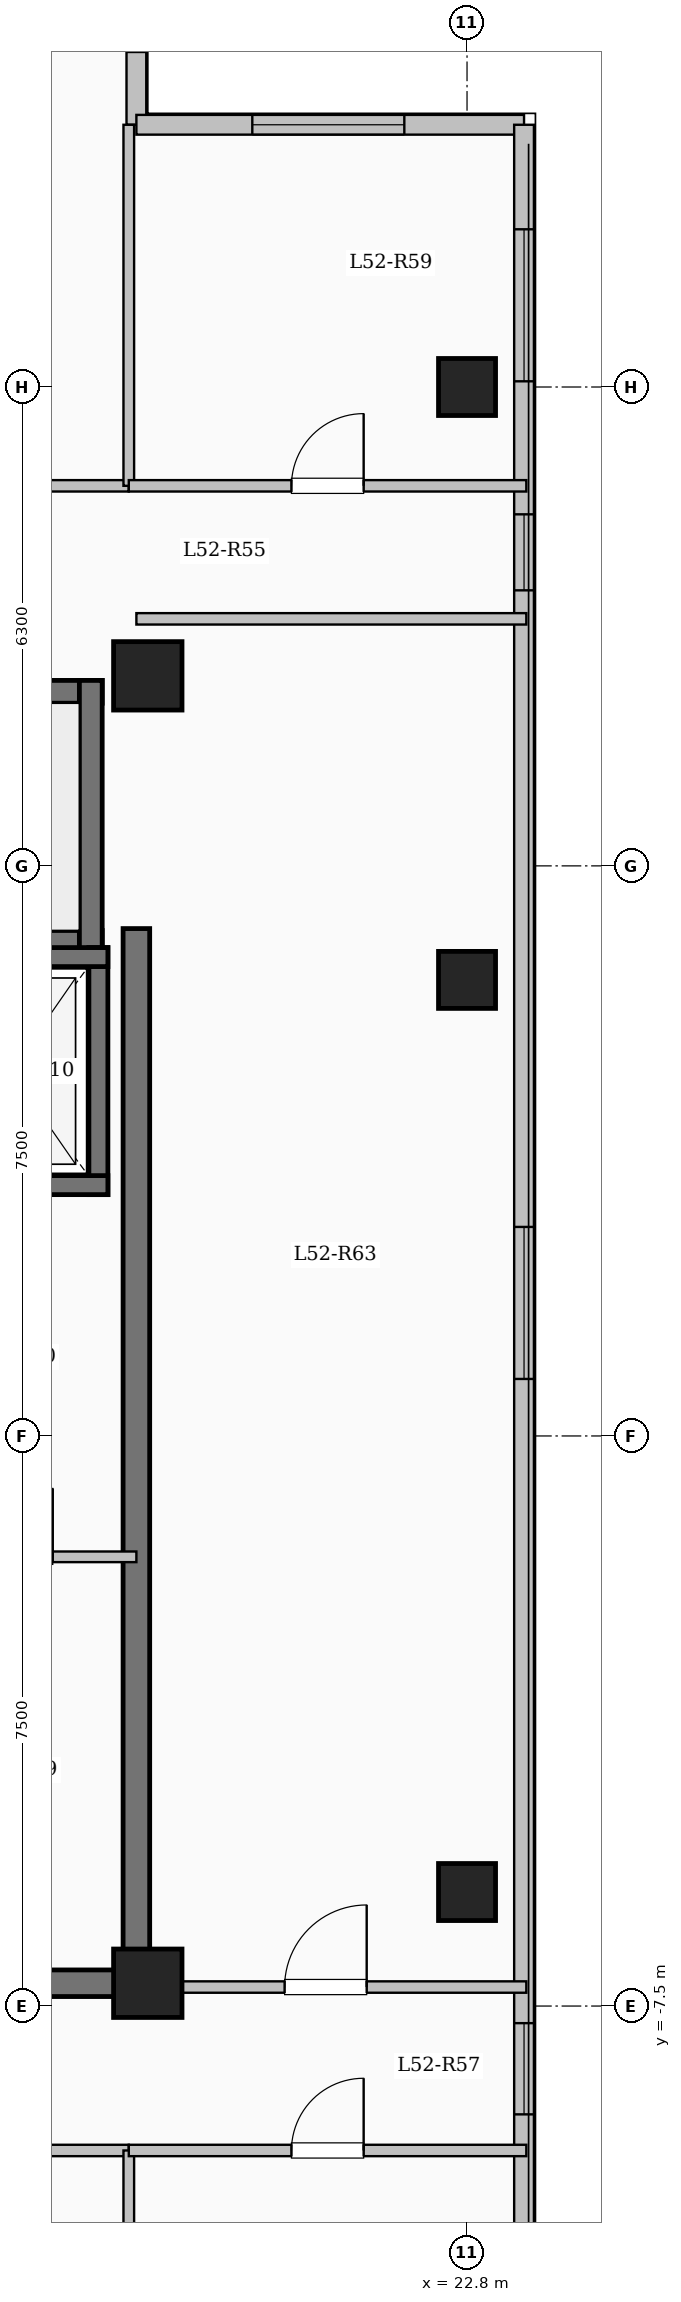
"""IFC4 building model, lengths in metres.
Left out: names, types, materials, properties, quantities, classifications, styles, units other than length and angle.
Written with IfcOpenShell. Run it as: python <this file> out.ifc"""

import sys

from ifc_helpers import new_model, si_unit, direction, frame, frame_2d, origin, origin_2d, place, context, subcontext, project, spatial, rectangle, extrude, element, fill, save


model = new_model("IFC4")
c1 = context("Model", 3, precision=1e-05, world=origin(), true_north=direction((0.0, 1.0)))
c2 = subcontext(c1, "Body", "Model", "MODEL_VIEW")
j1 = project(units=[si_unit("LENGTHUNIT", "METRE"), si_unit("PLANEANGLEUNIT", "RADIAN")], contexts=[c1])
p1 = place(None, origin())
s1 = spatial("IfcSite", under=j1, at=p1, CompositionType="ELEMENT")
p2 = place(p1, origin())
s2 = spatial("IfcBuilding", under=s1, at=p2, CompositionType="ELEMENT")
p3 = place(p2, frame((0.0, 0.0, 193.6)))
s3 = spatial("IfcBuildingStorey", under=s2, at=p3, CompositionType="ELEMENT", Elevation=193.6)
for number, where, z_axis, x_axis in (
    (1, (18.6, -7.2, 0.0), (0.0, 0.0, 1.0), (1.0, 0.0, 0.0)),
    (2, (18.6, 10.0, 0.0), (0.0, 0.0, 1.0), (1.0, 0.0, 0.0)),
):
    element("IfcColumn", number, at=place(p3, frame(where, z_axis=z_axis, x_axis=x_axis)), inside=s3, PredefinedType="COLUMN", context=c2, shape_type="SweptSolid", body=[
        extrude(rectangle(XDim=0.9, YDim=0.9, at=origin_2d()), origin(), (0.0, 0.0, 1.0), 3.35),
    ])
for number, where, z_axis, x_axis in (
    (3, (22.8, -6.0, 0.0), (0.0, 0.0, 1.0), (1.0, 0.0, 0.0)),
    (4, (22.8, 6.0, 0.0), (0.0, 0.0, 1.0), (1.0, 0.0, 0.0)),
    (5, (22.8, 13.8, 0.0), (0.0, 0.0, 1.0), (1.0, 0.0, 0.0)),
):
    element("IfcColumn", number, at=place(p3, frame(where, z_axis=z_axis, x_axis=x_axis)), inside=s3, PredefinedType="COLUMN", context=c2, shape_type="SweptSolid", body=[
        extrude(rectangle(XDim=0.75, YDim=0.75, at=origin_2d()), origin(), (0.0, 0.0, 1.0), 3.35),
    ])
p4 = place(p3, frame((18.45, 20.85, 0.0), z_axis=(0.0, 0.0, 1.0), x_axis=(0.0, -1.0, 0.0)))
e6 = element("IfcWall", 6, at=p4, inside=s3, PredefinedType="SOLIDWALL", context=c2, shape_type="SweptSolid", body=[
    extrude(rectangle(XDim=3.6, YDim=0.26, at=frame_2d((1.8, 0.0))), origin(), (0.0, 0.0, 1.0), 3.1),
])
p5 = place(p4, frame((0.992, 0.0, 0.9)))
e7 = element("IfcOpeningElement", 7, at=p5, cuts=e6, PredefinedType="OPENING", context=c2, shape_type="SweptSolid", body=[
    extrude(rectangle(XDim=1.65, YDim=1.6, at=frame_2d((0.825, 0.8))), frame((0.0, 0.14, 0.0), z_axis=(0.0, -1.0, 0.0), x_axis=(1.0, 0.0, 0.0)), (0.0, 0.0, 1.0), 0.28),
])
p6 = place(p3, frame((18.45, 17.25, 0.0), z_axis=(0.0, 0.0, 1.0), x_axis=(1.0, 0.0, 0.0)))
e8 = element("IfcWall", 8, at=p6, inside=s3, PredefinedType="SOLIDWALL", context=c2, shape_type="SweptSolid", body=[
    extrude(rectangle(XDim=5.1, YDim=0.26, at=frame_2d((2.55, 0.0))), origin(), (0.0, 0.0, 1.0), 3.1),
])
p7 = place(p6, frame((1.525, 0.0, 0.9)))
e9 = element("IfcOpeningElement", 9, at=p7, cuts=e8, PredefinedType="OPENING", context=c2, shape_type="SweptSolid", body=[
    extrude(rectangle(XDim=2.0, YDim=1.7, at=frame_2d((1.0, 0.85))), frame((0.0, 0.14, 0.0), z_axis=(0.0, -1.0, 0.0), x_axis=(1.0, 0.0, 0.0)), (0.0, 0.0, 1.0), 0.28),
])
p8 = place(p3, frame((23.55, 17.25, 0.0), z_axis=(0.0, 0.0, 1.0), x_axis=(0.0, -1.0, 0.0)))
e10 = element("IfcWall", 10, at=p8, inside=s3, PredefinedType="SOLIDWALL", context=c2, shape_type="SweptSolid", body=[
    extrude(rectangle(XDim=34.5, YDim=0.26, at=frame_2d((17.25, 0.0))), origin(), (0.0, 0.0, 1.0), 3.1),
])
p9 = place(p8, frame((1.375, 0.0, 0.9)))
e11 = element("IfcOpeningElement", 11, at=p9, cuts=e10, PredefinedType="OPENING", context=c2, shape_type="SweptSolid", body=[
    extrude(rectangle(XDim=2.0, YDim=1.7, at=frame_2d((1.0, 0.85))), frame((0.0, 0.14, 0.0), z_axis=(0.0, -1.0, 0.0), x_axis=(1.0, 0.0, 0.0)), (0.0, 0.0, 1.0), 0.28),
])
p10 = place(p8, frame((5.125, 0.0, 0.95)))
e12 = element("IfcOpeningElement", 12, at=p10, cuts=e10, PredefinedType="OPENING", context=c2, shape_type="SweptSolid", body=[
    extrude(rectangle(XDim=1.0, YDim=1.5, at=frame_2d((0.5, 0.75))), frame((0.0, 0.14, 0.0), z_axis=(0.0, -1.0, 0.0), x_axis=(1.0, 0.0, 0.0)), (0.0, 0.0, 1.0), 0.28),
])
p11 = place(p8, frame((14.5, 0.0, 0.9)))
e13 = element("IfcOpeningElement", 13, at=p11, cuts=e10, PredefinedType="OPENING", context=c2, shape_type="SweptSolid", body=[
    extrude(rectangle(XDim=2.0, YDim=1.7, at=frame_2d((1.0, 0.85))), frame((0.0, 0.14, 0.0), z_axis=(0.0, -1.0, 0.0), x_axis=(1.0, 0.0, 0.0)), (0.0, 0.0, 1.0), 0.28),
])
p12 = place(p8, frame((24.975, 0.0, 0.95)))
e14 = element("IfcOpeningElement", 14, at=p12, cuts=e10, PredefinedType="OPENING", context=c2, shape_type="SweptSolid", body=[
    extrude(rectangle(XDim=1.2, YDim=1.5, at=frame_2d((0.6, 0.75))), frame((0.0, 0.14, 0.0), z_axis=(0.0, -1.0, 0.0), x_axis=(1.0, 0.0, 0.0)), (0.0, 0.0, 1.0), 0.28),
])
p13 = place(p8, frame((29.475, 0.0, 0.9)))
e15 = element("IfcOpeningElement", 15, at=p13, cuts=e10, PredefinedType="OPENING", context=c2, shape_type="SweptSolid", body=[
    extrude(rectangle(XDim=2.2, YDim=1.75, at=frame_2d((1.1, 0.875))), frame((0.0, 0.14, 0.0), z_axis=(0.0, -1.0, 0.0), x_axis=(1.0, 0.0, 0.0)), (0.0, 0.0, 1.0), 0.28),
])
p14 = place(p3, frame((10.0, 9.79, 0.0), z_axis=(0.0, 0.0, 1.0), x_axis=(1.0, 0.0, 0.0)))
e16 = element("IfcWall", 16, at=p14, inside=s3, PredefinedType="SHEAR", context=c2, shape_type="SweptSolid", body=[
    extrude(rectangle(XDim=8.0, YDim=0.3, at=frame_2d((4.0, 0.0))), origin(), (0.0, 0.0, 1.0), 3.35),
])
p15 = place(p3, frame((10.0, 6.5, 0.0), z_axis=(0.0, 0.0, 1.0), x_axis=(1.0, 0.0, 0.0)))
e17 = element("IfcWall", 17, at=p15, inside=s3, PredefinedType="SHEAR", context=c2, shape_type="SweptSolid", body=[
    extrude(rectangle(XDim=8.0, YDim=0.3, at=frame_2d((4.0, 0.0))), origin(), (0.0, 0.0, 1.0), 3.35),
])
p16 = place(p15, frame((0.55, 0.0, 0.0)))
e18 = element("IfcOpeningElement", 18, at=p16, cuts=e17, PredefinedType="OPENING", context=c2, shape_type="SweptSolid", body=[
    extrude(rectangle(XDim=1.0, YDim=2.15, at=frame_2d((0.5, 1.075))), frame((0.0, 0.16, 0.0), z_axis=(0.0, -1.0, 0.0), x_axis=(1.0, 0.0, 0.0)), (0.0, 0.0, 1.0), 0.32),
])
p17 = place(p3, frame((17.85, 6.35, 0.0), z_axis=(0.0, 0.0, 1.0), x_axis=(0.0, 1.0, 0.0)))
e19 = element("IfcWall", 19, at=p17, inside=s3, PredefinedType="SHEAR", context=c2, shape_type="SweptSolid", body=[
    extrude(rectangle(XDim=3.59, YDim=0.3, at=frame_2d((1.795, 0.0))), origin(), (0.0, 0.0, 1.0), 3.35),
])
p18 = place(p3, frame((17.95, 3.175, 0.0), z_axis=(0.0, 0.0, 1.0), x_axis=(0.0, 1.0, 0.0)))
e20 = element("IfcWall", 20, at=p18, inside=s3, PredefinedType="SHEAR", context=c2, shape_type="SweptSolid", body=[
    extrude(rectangle(XDim=3.25, YDim=0.25, at=frame_2d((1.625, 0.0))), origin(), (0.0, 0.0, 1.0), 3.35),
])
for number, where, z_axis, x_axis in (
    (21, (15.525, 3.3, 0.0), (0.0, 0.0, 1.0), (1.0, 0.0, 0.0)),
    (22, (15.525, 6.3, 0.0), (0.0, 0.0, 1.0), (1.0, 0.0, 0.0)),
):
    element("IfcWall", number, at=place(p3, frame(where, z_axis=z_axis, x_axis=x_axis)), inside=s3, PredefinedType="SHEAR", context=c2, shape_type="SweptSolid", body=[
        extrude(rectangle(XDim=2.55, YDim=0.25, at=frame_2d((1.275, 0.0))), origin(), (0.0, 0.0, 1.0), 3.35),
    ])
p19 = place(p3, frame((18.45, -7.375, 0.0), z_axis=(0.0, 0.0, 1.0), x_axis=(0.0, 1.0, 0.0)))
e23 = element("IfcWall", 23, at=p19, inside=s3, PredefinedType="SHEAR", context=c2, shape_type="SweptSolid", body=[
    extrude(rectangle(XDim=14.05, YDim=0.35, at=frame_2d((7.025, 0.0))), origin(), (0.0, 0.0, 1.0), 3.35),
])
p20 = place(p3, frame((12.625, -7.2, 0.0), z_axis=(0.0, 0.0, 1.0), x_axis=(1.0, 0.0, 0.0)))
e24 = element("IfcWall", 24, at=p20, inside=s3, PredefinedType="SHEAR", context=c2, shape_type="SweptSolid", body=[
    extrude(rectangle(XDim=6.0, YDim=0.35, at=frame_2d((3.0, 0.0))), origin(), (0.0, 0.0, 1.0), 3.35),
])
p21 = place(p3, frame((15.4, -1.59, 0.0), z_axis=(0.0, 0.0, 1.0), x_axis=(1.0, 0.0, 0.0)))
e25 = element("IfcWall", 25, at=p21, inside=s3, PredefinedType="PARTITIONING", context=c2, shape_type="SweptSolid", body=[
    extrude(rectangle(XDim=3.05, YDim=0.14, at=frame_2d((1.525, 0.0))), origin(), (0.0, 0.0, 1.0), 3.1),
])
p22 = place(p21, frame((1.05, 0.0, 0.0)))
e26 = element("IfcOpeningElement", 26, at=p22, cuts=e25, PredefinedType="OPENING", context=c2, shape_type="SweptSolid", body=[
    extrude(rectangle(XDim=0.9, YDim=2.08, at=frame_2d((0.45, 1.04))), frame((0.0, 0.08, 0.0), z_axis=(0.0, -1.0, 0.0), x_axis=(1.0, 0.0, 0.0)), (0.0, 0.0, 1.0), 0.16),
])
p23 = place(p3, frame((3.85, 12.5, 0.0), z_axis=(0.0, 0.0, 1.0), x_axis=(1.0, 0.0, 0.0)))
e27 = element("IfcWall", 27, at=p23, inside=s3, PredefinedType="PARTITIONING", context=c2, shape_type="SweptSolid", body=[
    extrude(rectangle(XDim=14.5, YDim=0.15, at=frame_2d((7.25, 0.0))), origin(), (0.0, 0.0, 1.0), 3.1),
])
p24 = place(p23, frame((2.186, 0.0, 0.0)))
e28 = element("IfcOpeningElement", 28, at=p24, cuts=e27, PredefinedType="OPENING", context=c2, shape_type="SweptSolid", body=[
    extrude(rectangle(XDim=0.95, YDim=2.15, at=frame_2d((0.475, 1.075))), frame((0.0, 0.085, 0.0), z_axis=(0.0, -1.0, 0.0), x_axis=(1.0, 0.0, 0.0)), (0.0, 0.0, 1.0), 0.17),
])
p25 = place(p23, frame((7.379, 0.0, 0.0)))
e29 = element("IfcOpeningElement", 29, at=p25, cuts=e27, PredefinedType="OPENING", context=c2, shape_type="SweptSolid", body=[
    extrude(rectangle(XDim=0.95, YDim=2.15, at=frame_2d((0.475, 1.075))), frame((0.0, 0.085, 0.0), z_axis=(0.0, -1.0, 0.0), x_axis=(1.0, 0.0, 0.0)), (0.0, 0.0, 1.0), 0.17),
])
p26 = place(p23, frame((11.998, 0.0, 0.0)))
e30 = element("IfcOpeningElement", 30, at=p26, cuts=e27, PredefinedType="OPENING", context=c2, shape_type="SweptSolid", body=[
    extrude(rectangle(XDim=0.95, YDim=2.15, at=frame_2d((0.475, 1.075))), frame((0.0, 0.085, 0.0), z_axis=(0.0, -1.0, 0.0), x_axis=(1.0, 0.0, 0.0)), (0.0, 0.0, 1.0), 0.17),
])
p27 = place(p3, frame((8.55, -9.4, 0.0), z_axis=(0.0, 0.0, 1.0), x_axis=(1.0, 0.0, 0.0)))
e31 = element("IfcWall", 31, at=p27, inside=s3, PredefinedType="PARTITIONING", context=c2, shape_type="SweptSolid", body=[
    extrude(rectangle(XDim=9.8, YDim=0.15, at=frame_2d((4.9, 0.0))), origin(), (0.0, 0.0, 1.0), 3.1),
])
p28 = place(p27, frame((0.9, 0.0, 0.0)))
e32 = element("IfcOpeningElement", 32, at=p28, cuts=e31, PredefinedType="OPENING", context=c2, shape_type="SweptSolid", body=[
    extrude(rectangle(XDim=0.96, YDim=2.15, at=frame_2d((0.48, 1.075))), frame((0.0, 0.085, 0.0), z_axis=(0.0, -1.0, 0.0), x_axis=(1.0, 0.0, 0.0)), (0.0, 0.0, 1.0), 0.17),
])
p29 = place(p27, frame((5.625, 0.0, 0.0)))
e33 = element("IfcOpeningElement", 33, at=p29, cuts=e31, PredefinedType="OPENING", context=c2, shape_type="SweptSolid", body=[
    extrude(rectangle(XDim=0.96, YDim=2.15, at=frame_2d((0.48, 1.075))), frame((0.0, 0.085, 0.0), z_axis=(0.0, -1.0, 0.0), x_axis=(1.0, 0.0, 0.0)), (0.0, 0.0, 1.0), 0.17),
])
p30 = place(p3, frame((18.45, -7.25, 0.0), z_axis=(0.0, 0.0, 1.0), x_axis=(1.0, 0.0, 0.0)))
e34 = element("IfcWall", 34, at=p30, inside=s3, PredefinedType="PARTITIONING", context=c2, shape_type="SweptSolid", body=[
    extrude(rectangle(XDim=5.13, YDim=0.15, at=frame_2d((2.565, 0.0))), origin(), (0.0, 0.0, 1.0), 3.1),
])
p31 = place(p30, frame((1.95, 0.0, 0.0)))
e35 = element("IfcOpeningElement", 35, at=p31, cuts=e34, PredefinedType="OPENING", context=c2, shape_type="SweptSolid", body=[
    extrude(rectangle(XDim=1.08, YDim=2.15, at=frame_2d((0.54, 1.075))), frame((0.0, 0.085, 0.0), z_axis=(0.0, -1.0, 0.0), x_axis=(1.0, 0.0, 0.0)), (0.0, 0.0, 1.0), 0.17),
])
p32 = place(p3, frame((18.45, 10.75, 0.0), z_axis=(0.0, 0.0, 1.0), x_axis=(1.0, 0.0, 0.0)))
e36 = element("IfcWall", 36, at=p32, inside=s3, PredefinedType="PARTITIONING", context=c2, shape_type="SweptSolid", body=[
    extrude(rectangle(XDim=5.13, YDim=0.15, at=frame_2d((2.565, 0.0))), origin(), (0.0, 0.0, 1.0), 3.1),
])
p33 = place(p3, frame((18.35, -17.25, 0.0), z_axis=(0.0, 0.0, 1.0), x_axis=(0.0, 1.0, 0.0)))
e37 = element("IfcWall", 37, at=p33, inside=s3, PredefinedType="PARTITIONING", context=c2, shape_type="SweptSolid", body=[
    extrude(rectangle(XDim=7.85, YDim=0.14, at=frame_2d((3.925, 0.0))), origin(), (0.0, 0.0, 1.0), 3.1),
])
p34 = place(p3, frame((18.35, 12.5, 0.0), z_axis=(0.0, 0.0, 1.0), x_axis=(0.0, 1.0, 0.0)))
e38 = element("IfcWall", 38, at=p34, inside=s3, PredefinedType="PARTITIONING", context=c2, shape_type="SweptSolid", body=[
    extrude(rectangle(XDim=4.75, YDim=0.14, at=frame_2d((2.375, 0.0))), origin(), (0.0, 0.0, 1.0), 3.1),
])
p35 = place(p3, frame((18.35, 12.5, 0.0), z_axis=(0.0, 0.0, 1.0), x_axis=(1.0, 0.0, 0.0)))
e39 = element("IfcWall", 39, at=p35, inside=s3, PredefinedType="PARTITIONING", context=c2, shape_type="SweptSolid", body=[
    extrude(rectangle(XDim=5.23, YDim=0.15, at=frame_2d((2.615, 0.0))), origin(), (0.0, 0.0, 1.0), 3.1),
])
p36 = place(p35, frame((2.14, 0.0, 0.0)))
e40 = element("IfcOpeningElement", 40, at=p36, cuts=e39, PredefinedType="OPENING", context=c2, shape_type="SweptSolid", body=[
    extrude(rectangle(XDim=0.95, YDim=2.15, at=frame_2d((0.475, 1.075))), frame((0.0, 0.085, 0.0), z_axis=(0.0, -1.0, 0.0), x_axis=(1.0, 0.0, 0.0)), (0.0, 0.0, 1.0), 0.17),
])
p37 = place(p3, frame((18.35, -9.4, 0.0), z_axis=(0.0, 0.0, 1.0), x_axis=(1.0, 0.0, 0.0)))
e41 = element("IfcWall", 41, at=p37, inside=s3, PredefinedType="PARTITIONING", context=c2, shape_type="SweptSolid", body=[
    extrude(rectangle(XDim=5.23, YDim=0.15, at=frame_2d((2.615, 0.0))), origin(), (0.0, 0.0, 1.0), 3.1),
])
p38 = place(p37, frame((2.14, 0.0, 0.0)))
e42 = element("IfcOpeningElement", 42, at=p38, cuts=e41, PredefinedType="OPENING", context=c2, shape_type="SweptSolid", body=[
    extrude(rectangle(XDim=0.95, YDim=2.15, at=frame_2d((0.475, 1.075))), frame((0.0, 0.085, 0.0), z_axis=(0.0, -1.0, 0.0), x_axis=(1.0, 0.0, 0.0)), (0.0, 0.0, 1.0), 0.17),
])
p39 = place(p7, origin())
e43 = element("IfcWindow", 43, at=p39, inside=s3, PartitioningType="SINGLE_PANEL", PredefinedType="WINDOW", context=c2, shape_type="SweptSolid", body=[
    extrude(rectangle(XDim=2.0, YDim=1.7, at=frame_2d((1.0, 0.85))), frame((0.0, 0.03, 0.0), z_axis=(0.0, -1.0, 0.0), x_axis=(1.0, 0.0, 0.0)), (0.0, 0.0, 1.0), 0.06),
])
fill(e9, e43)
p40 = place(p9, origin())
e44 = element("IfcWindow", 44, at=p40, inside=s3, PartitioningType="SINGLE_PANEL", PredefinedType="WINDOW", context=c2, shape_type="SweptSolid", body=[
    extrude(rectangle(XDim=2.0, YDim=1.7, at=frame_2d((1.0, 0.85))), frame((0.0, 0.03, 0.0), z_axis=(0.0, -1.0, 0.0), x_axis=(1.0, 0.0, 0.0)), (0.0, 0.0, 1.0), 0.06),
])
fill(e11, e44)
p41 = place(p10, origin())
e45 = element("IfcWindow", 45, at=p41, inside=s3, PartitioningType="SINGLE_PANEL", PredefinedType="WINDOW", context=c2, shape_type="SweptSolid", body=[
    extrude(rectangle(XDim=1.0, YDim=1.5, at=frame_2d((0.5, 0.75))), frame((0.0, 0.03, 0.0), z_axis=(0.0, -1.0, 0.0), x_axis=(1.0, 0.0, 0.0)), (0.0, 0.0, 1.0), 0.06),
])
fill(e12, e45)
p42 = place(p11, origin())
e46 = element("IfcWindow", 46, at=p42, inside=s3, PartitioningType="SINGLE_PANEL", PredefinedType="WINDOW", context=c2, shape_type="SweptSolid", body=[
    extrude(rectangle(XDim=2.0, YDim=1.7, at=frame_2d((1.0, 0.85))), frame((0.0, 0.03, 0.0), z_axis=(0.0, -1.0, 0.0), x_axis=(1.0, 0.0, 0.0)), (0.0, 0.0, 1.0), 0.06),
])
fill(e13, e46)
p43 = place(p12, origin())
e47 = element("IfcWindow", 47, at=p43, inside=s3, PartitioningType="SINGLE_PANEL", PredefinedType="WINDOW", context=c2, shape_type="SweptSolid", body=[
    extrude(rectangle(XDim=1.2, YDim=1.5, at=frame_2d((0.6, 0.75))), frame((0.0, 0.03, 0.0), z_axis=(0.0, -1.0, 0.0), x_axis=(1.0, 0.0, 0.0)), (0.0, 0.0, 1.0), 0.06),
])
fill(e14, e47)
p44 = place(p36, origin())
e48 = element("IfcDoor", 48, at=p44, inside=s3, OperationType="SINGLE_SWING_RIGHT", PredefinedType="DOOR", context=c2, shape_type="SweptSolid", body=[
    extrude(rectangle(XDim=0.95, YDim=2.15, at=frame_2d((0.475, 1.075))), frame((0.0, 0.025, 0.0), z_axis=(0.0, -1.0, 0.0), x_axis=(1.0, 0.0, 0.0)), (0.0, 0.0, 1.0), 0.05),
])
fill(e40, e48)
p45 = place(p38, origin())
e49 = element("IfcDoor", 49, at=p45, inside=s3, OperationType="SINGLE_SWING_RIGHT", PredefinedType="DOOR", context=c2, shape_type="SweptSolid", body=[
    extrude(rectangle(XDim=0.95, YDim=2.15, at=frame_2d((0.475, 1.075))), frame((0.0, 0.025, 0.0), z_axis=(0.0, -1.0, 0.0), x_axis=(1.0, 0.0, 0.0)), (0.0, 0.0, 1.0), 0.05),
])
fill(e42, e49)
p46 = place(p31, origin())
e50 = element("IfcDoor", 50, at=p46, inside=s3, OperationType="SINGLE_SWING_RIGHT", PredefinedType="DOOR", context=c2, shape_type="SweptSolid", body=[
    extrude(rectangle(XDim=1.08, YDim=2.15, at=frame_2d((0.54, 1.075))), frame((0.0, 0.025, 0.0), z_axis=(0.0, -1.0, 0.0), x_axis=(1.0, 0.0, 0.0)), (0.0, 0.0, 1.0), 0.05),
])
fill(e35, e50)
save(model, sys.argv[1])
